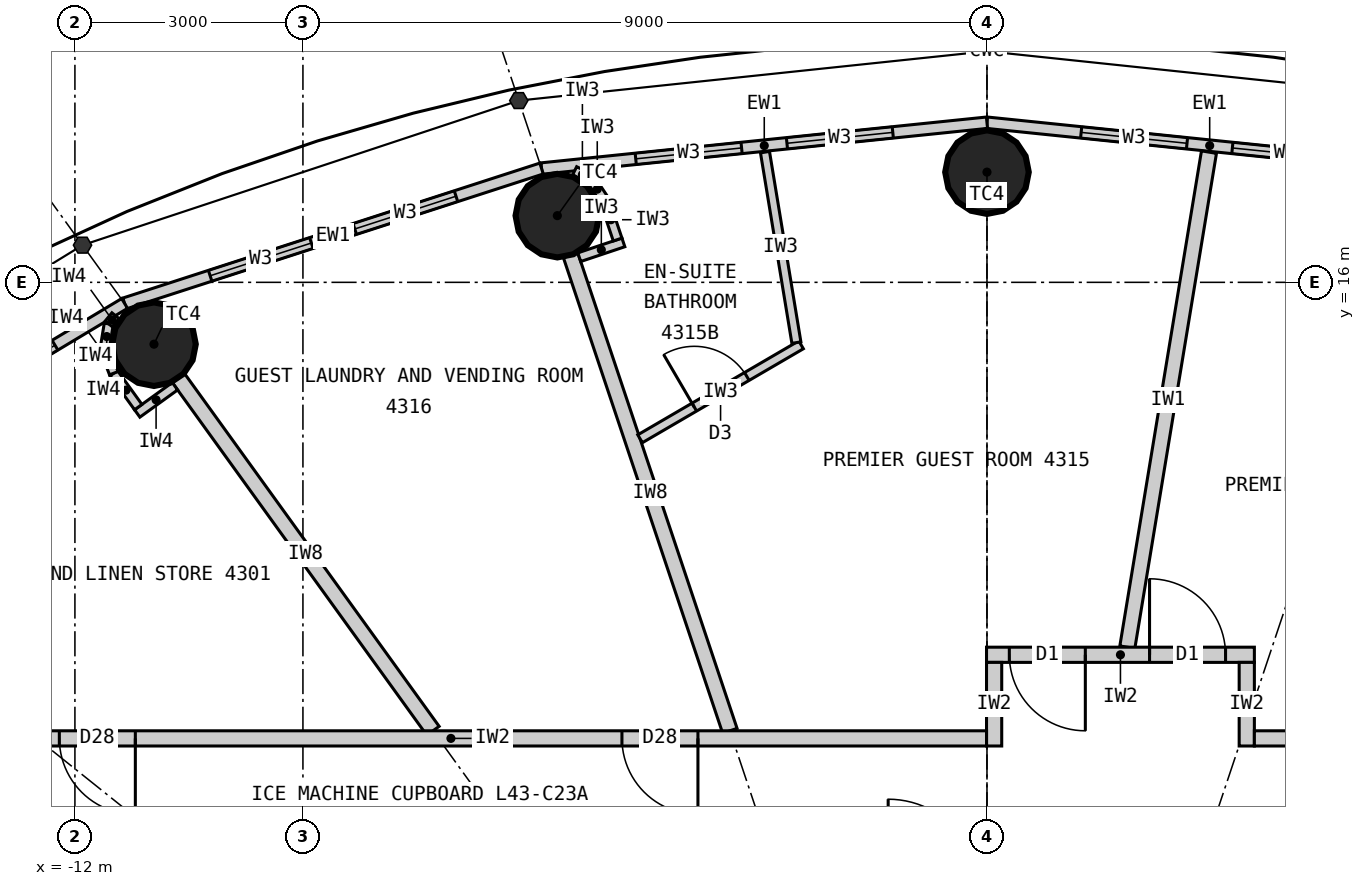
"""IFC4 building model, lengths in metres.
Left out: names, types, materials, properties, quantities, classifications, styles, units other than length and angle.
Written with IfcOpenShell. Run it as: python <this file> out.ifc"""

import sys

from ifc_helpers import new_model, si_unit, direction, frame, frame_2d, origin, origin_2d, place, context, subcontext, project, spatial, rectangle, circle, extrude, element, fill, save


model = new_model("IFC4")
c1 = context("Model", 3, precision=1e-05, world=origin(), true_north=direction((0.0, 1.0)))
c2 = subcontext(c1, "Body", "Model", "MODEL_VIEW")
j1 = project(units=[si_unit("LENGTHUNIT", "METRE"), si_unit("PLANEANGLEUNIT", "RADIAN")], contexts=[c1])
p1 = place(None, origin())
s1 = spatial("IfcSite", under=j1, at=p1, CompositionType="ELEMENT")
p2 = place(p1, origin())
s2 = spatial("IfcBuilding", under=s1, at=p2, CompositionType="ELEMENT")
p3 = place(p2, frame((0.0, 0.0, 163.2)))
s3 = spatial("IfcBuildingStorey", under=s2, at=p3, CompositionType="ELEMENT", Elevation=163.2)
for number, where, z_axis, x_axis in (
    (1, (0.0, 17.45, 0.0), (0.0, 0.0, 1.0), (1.0, 0.0, 0.0)),
    (2, (-5.653, 16.877, 0.0), (0.0, 0.0, 1.0), (1.0, 0.0, 0.0)),
    (3, (-10.96, 15.186, 0.0), (0.0, 0.0, 1.0), (1.0, 0.0, 0.0)),
):
    element("IfcColumn", number, at=place(p3, frame(where, z_axis=z_axis, x_axis=x_axis)), inside=s3, PredefinedType="COLUMN", context=c2, shape_type="SweptSolid", body=[
        extrude(circle(Radius=0.55, at=origin_2d()), origin(), (0.0, 0.0, 1.0), 3.3),
    ])
p4 = place(p3, frame((5.86, 17.497, 0.0), z_axis=(0.0, 0.0, 1.0), x_axis=(-0.994751738032, 0.102318032045, 0.0)))
e4 = element("IfcWall", 4, at=p4, inside=s3, PredefinedType="ELEMENTEDWALL", context=c2, shape_type="SweptSolid", body=[
    extrude(rectangle(XDim=5.891, YDim=0.15, at=frame_2d((2.946, 0.0))), origin(), (0.0, 0.0, 1.0), 3.12),
])
p5 = place(p4, frame((1.246, 0.0, 0.9)))
e5 = element("IfcOpeningElement", 5, at=p5, cuts=e4, PredefinedType="OPENING", context=c2, shape_type="SweptSolid", body=[
    extrude(rectangle(XDim=1.4, YDim=1.9, at=frame_2d((0.7, 0.95))), frame((0.0, 0.085, 0.0), z_axis=(0.0, -1.0, 0.0), x_axis=(1.0, 0.0, 0.0)), (0.0, 0.0, 1.0), 0.17),
])
p6 = place(p4, frame((3.246, 0.0, 0.9)))
e6 = element("IfcOpeningElement", 6, at=p6, cuts=e4, PredefinedType="OPENING", context=c2, shape_type="SweptSolid", body=[
    extrude(rectangle(XDim=1.4, YDim=1.9, at=frame_2d((0.7, 0.95))), frame((0.0, 0.085, 0.0), z_axis=(0.0, -1.0, 0.0), x_axis=(1.0, 0.0, 0.0)), (0.0, 0.0, 1.0), 0.17),
])
p7 = place(p3, frame((0.0, 18.1, 0.0), z_axis=(0.0, 0.0, 1.0), x_axis=(-0.994751738032, -0.102318032045, 0.0)))
e7 = element("IfcWall", 7, at=p7, inside=s3, PredefinedType="ELEMENTEDWALL", context=c2, shape_type="SweptSolid", body=[
    extrude(rectangle(XDim=5.891, YDim=0.15, at=frame_2d((2.946, 0.0))), origin(), (0.0, 0.0, 1.0), 3.12),
])
p8 = place(p7, frame((1.246, 0.0, 0.9)))
e8 = element("IfcOpeningElement", 8, at=p8, cuts=e7, PredefinedType="OPENING", context=c2, shape_type="SweptSolid", body=[
    extrude(rectangle(XDim=1.4, YDim=1.9, at=frame_2d((0.7, 0.95))), frame((0.0, 0.085, 0.0), z_axis=(0.0, -1.0, 0.0), x_axis=(1.0, 0.0, 0.0)), (0.0, 0.0, 1.0), 0.17),
])
p9 = place(p7, frame((3.246, 0.0, 0.9)))
e9 = element("IfcOpeningElement", 9, at=p9, cuts=e7, PredefinedType="OPENING", context=c2, shape_type="SweptSolid", body=[
    extrude(rectangle(XDim=1.4, YDim=1.9, at=frame_2d((0.7, 0.95))), frame((0.0, 0.085, 0.0), z_axis=(0.0, -1.0, 0.0), x_axis=(1.0, 0.0, 0.0)), (0.0, 0.0, 1.0), 0.17),
])
p10 = place(p3, frame((-5.86, 17.497, 0.0), z_axis=(0.0, 0.0, 1.0), x_axis=(-0.951432482129, -0.307857486429, 0.0)))
e10 = element("IfcWall", 10, at=p10, inside=s3, PredefinedType="ELEMENTEDWALL", context=c2, shape_type="SweptSolid", body=[
    extrude(rectangle(XDim=5.766, YDim=0.15, at=frame_2d((2.883, 0.0))), origin(), (0.0, 0.0, 1.0), 3.12),
])
p11 = place(p10, frame((1.183, 0.0, 0.9)))
e11 = element("IfcOpeningElement", 11, at=p11, cuts=e10, PredefinedType="OPENING", context=c2, shape_type="SweptSolid", body=[
    extrude(rectangle(XDim=1.4, YDim=1.9, at=frame_2d((0.7, 0.95))), frame((0.0, 0.085, 0.0), z_axis=(0.0, -1.0, 0.0), x_axis=(1.0, 0.0, 0.0)), (0.0, 0.0, 1.0), 0.17),
])
p12 = place(p10, frame((3.183, 0.0, 0.9)))
e12 = element("IfcOpeningElement", 12, at=p12, cuts=e10, PredefinedType="OPENING", context=c2, shape_type="SweptSolid", body=[
    extrude(rectangle(XDim=1.4, YDim=1.9, at=frame_2d((0.7, 0.95))), frame((0.0, 0.085, 0.0), z_axis=(0.0, -1.0, 0.0), x_axis=(1.0, 0.0, 0.0)), (0.0, 0.0, 1.0), 0.17),
])
p13 = place(p3, frame((-11.346, 15.722, 0.0), z_axis=(0.0, 0.0, 1.0), x_axis=(-0.857695199231, -0.514158482587, 0.0)))
e13 = element("IfcWall", 13, at=p13, inside=s3, PredefinedType="ELEMENTEDWALL", context=c2, shape_type="SweptSolid", body=[
    extrude(rectangle(XDim=5.536, YDim=0.15, at=frame_2d((2.768, 0.0))), origin(), (0.0, 0.0, 1.0), 3.12),
])
p14 = place(p13, frame((1.068, 0.0, 0.9)))
e14 = element("IfcOpeningElement", 14, at=p14, cuts=e13, PredefinedType="OPENING", context=c2, shape_type="SweptSolid", body=[
    extrude(rectangle(XDim=1.4, YDim=1.9, at=frame_2d((0.7, 0.95))), frame((0.0, 0.085, 0.0), z_axis=(0.0, -1.0, 0.0), x_axis=(1.0, 0.0, 0.0)), (0.0, 0.0, 1.0), 0.17),
])
p15 = place(p13, frame((3.068, 0.0, 0.9)))
e15 = element("IfcOpeningElement", 15, at=p15, cuts=e13, PredefinedType="OPENING", context=c2, shape_type="SweptSolid", body=[
    extrude(rectangle(XDim=1.4, YDim=1.9, at=frame_2d((0.7, 0.95))), frame((0.0, 0.085, 0.0), z_axis=(0.0, -1.0, 0.0), x_axis=(1.0, 0.0, 0.0)), (0.0, 0.0, 1.0), 0.17),
])
p16 = place(p3, frame((1.847, 11.2, 0.0), z_axis=(0.0, 0.0, 1.0), x_axis=(0.162695449404, 0.986676335352, 0.0)))
e16 = element("IfcWall", 16, at=p16, inside=s3, PredefinedType="PARTITIONING", context=c2, shape_type="SweptSolid", body=[
    extrude(rectangle(XDim=6.601, YDim=0.2, at=frame_2d((3.301, 0.0))), origin(), (0.0, 0.0, 1.0), 3.12),
])
p17 = place(p3, frame((-3.383, 10.1, 0.0), z_axis=(0.0, 0.0, 1.0), x_axis=(-0.317615120474, 0.948219718866, 0.0)))
e17 = element("IfcWall", 17, at=p17, inside=s3, PredefinedType="PARTITIONING", context=c2, shape_type="SweptSolid", body=[
    extrude(rectangle(XDim=6.597, YDim=0.2, at=frame_2d((3.299, 0.0))), origin(), (0.0, 0.0, 1.0), 2.42),
])
p18 = place(p3, frame((-7.289, 10.1, 0.0), z_axis=(0.0, 0.0, 1.0), x_axis=(-0.585222595178, 0.810872686735, 0.0)))
e18 = element("IfcWall", 18, at=p18, inside=s3, PredefinedType="PARTITIONING", context=c2, shape_type="SweptSolid", body=[
    extrude(rectangle(XDim=5.722, YDim=0.2, at=frame_2d((2.861, 0.0))), origin(), (0.0, 0.0, 1.0), 2.42),
])
p19 = place(p3, frame((-0.006, 11.1, 0.0), z_axis=(0.0, 0.0, 1.0), x_axis=(1.0, 0.0, 0.0)))
e19 = element("IfcWall", 19, at=p19, inside=s3, PredefinedType="PARTITIONING", context=c2, shape_type="SweptSolid", body=[
    extrude(rectangle(XDim=3.524, YDim=0.2, at=frame_2d((1.762, 0.0))), origin(), (0.0, 0.0, 1.0), 3.12),
])
p20 = place(p19, frame((2.145, 0.0, 0.0)))
e20 = element("IfcOpeningElement", 20, at=p20, cuts=e19, PredefinedType="OPENING", context=c2, shape_type="SweptSolid", body=[
    extrude(rectangle(XDim=1.0, YDim=2.2, at=frame_2d((0.5, 1.1))), frame((0.0, 0.11, 0.0), z_axis=(0.0, -1.0, 0.0), x_axis=(1.0, 0.0, 0.0)), (0.0, 0.0, 1.0), 0.22),
])
p21 = place(p19, frame((0.3, 0.0, 0.0)))
e21 = element("IfcOpeningElement", 21, at=p21, cuts=e19, PredefinedType="OPENING", context=c2, shape_type="SweptSolid", body=[
    extrude(rectangle(XDim=1.0, YDim=2.2, at=frame_2d((0.5, 1.1))), frame((0.0, 0.11, 0.0), z_axis=(0.0, -1.0, 0.0), x_axis=(1.0, 0.0, 0.0)), (0.0, 0.0, 1.0), 0.22),
])
p22 = place(p3, frame((0.094, 9.9, 0.0), z_axis=(0.0, 0.0, 1.0), x_axis=(0.0, 1.0, 0.0)))
e22 = element("IfcWall", 22, at=p22, inside=s3, PredefinedType="PARTITIONING", context=c2, shape_type="SweptSolid", body=[
    extrude(rectangle(XDim=1.1, YDim=0.2, at=frame_2d((0.55, 0.0))), origin(), (0.0, 0.0, 1.0), 2.42),
])
p23 = place(p3, frame((3.418, 9.9, 0.0), z_axis=(0.0, 0.0, 1.0), x_axis=(0.0, 1.0, 0.0)))
e23 = element("IfcWall", 23, at=p23, inside=s3, PredefinedType="PARTITIONING", context=c2, shape_type="SweptSolid", body=[
    extrude(rectangle(XDim=1.1, YDim=0.2, at=frame_2d((0.55, 0.0))), origin(), (0.0, 0.0, 1.0), 3.12),
])
p24 = place(p3, frame((-4.564, 13.942, 0.0), z_axis=(0.0, 0.0, 1.0), x_axis=(0.863717519451, 0.503976236139, 0.0)))
e24 = element("IfcWall", 24, at=p24, inside=s3, PredefinedType="PARTITIONING", context=c2, shape_type="SweptSolid", body=[
    extrude(rectangle(XDim=2.453, YDim=0.12, at=frame_2d((1.226, 0.0))), origin(), (0.0, 0.0, 1.0), 3.12),
])
p25 = place(p24, frame((0.826, 0.0, 0.0)))
e25 = element("IfcOpeningElement", 25, at=p25, cuts=e24, PredefinedType="OPENING", context=c2, shape_type="SweptSolid", body=[
    extrude(rectangle(XDim=0.8, YDim=2.1, at=frame_2d((0.4, 1.05))), frame((0.0, 0.07, 0.0), z_axis=(0.0, -1.0, 0.0), x_axis=(1.0, 0.0, 0.0)), (0.0, 0.0, 1.0), 0.14),
])
p26 = place(p3, frame((-2.508, 15.207, 0.0), z_axis=(0.0, 0.0, 1.0), x_axis=(-0.162637365963, 0.986685911115, 0.0)))
e26 = element("IfcWall", 26, at=p26, inside=s3, PredefinedType="PARTITIONING", context=c2, shape_type="SweptSolid", body=[
    extrude(rectangle(XDim=2.54, YDim=0.12, at=frame_2d((1.27, 0.0))), origin(), (0.0, 0.0, 1.0), 3.12),
])
p27 = place(p3, frame((-5.364, 16.331, 0.0), z_axis=(0.0, 0.0, 1.0), x_axis=(0.948283770087, 0.317423835572, 0.0)))
e27 = element("IfcWall", 27, at=p27, inside=s3, PredefinedType="PARTITIONING", context=c2, shape_type="SweptSolid", body=[
    extrude(rectangle(XDim=0.612, YDim=0.12, at=frame_2d((0.306, 0.0))), origin(), (0.0, 0.0, 1.0), 3.12),
])
p28 = place(p3, frame((-4.86, 16.563, 0.0), z_axis=(0.0, 0.0, 1.0), x_axis=(-0.317825321803, 0.948149284038, 0.0)))
e28 = element("IfcWall", 28, at=p28, inside=s3, PredefinedType="PARTITIONING", context=c2, shape_type="SweptSolid", body=[
    extrude(rectangle(XDim=0.55, YDim=0.12, at=frame_2d((0.275, 0.0))), origin(), (0.0, 0.0, 1.0), 3.12),
])
p29 = place(p3, frame((-5.034, 17.084, 0.0), z_axis=(0.0, 0.0, 1.0), x_axis=(-0.552362205726, 0.833604218851, 0.0)))
e29 = element("IfcWall", 29, at=p29, inside=s3, PredefinedType="PARTITIONING", context=c2, shape_type="SweptSolid", body=[
    extrude(rectangle(XDim=0.338, YDim=0.12, at=frame_2d((0.169, 0.0))), origin(), (0.0, 0.0, 1.0), 3.12),
])
p30 = place(p3, frame((-5.221, 17.366, 0.0), z_axis=(0.0, 0.0, 1.0), x_axis=(-0.895067896179, 0.445929883759, 0.0)))
e30 = element("IfcWall", 30, at=p30, inside=s3, PredefinedType="PARTITIONING", context=c2, shape_type="SweptSolid", body=[
    extrude(rectangle(XDim=0.228, YDim=0.12, at=frame_2d((0.114, 0.0))), origin(), (0.0, 0.0, 1.0), 3.12),
])
p31 = place(p3, frame((-14.1, 10.0, 0.0), z_axis=(0.0, 0.0, 1.0), x_axis=(1.0, 0.0, 0.0)))
e31 = element("IfcWall", 31, at=p31, inside=s3, PredefinedType="PARTITIONING", context=c2, shape_type="SweptSolid", body=[
    extrude(rectangle(XDim=14.094, YDim=0.2, at=frame_2d((7.047, 0.0))), origin(), (0.0, 0.0, 1.0), 3.12),
])
p32 = place(p31, frame((1.895, 0.0, 0.0)))
e32 = element("IfcOpeningElement", 32, at=p32, cuts=e31, PredefinedType="OPENING", context=c2, shape_type="SweptSolid", body=[
    extrude(rectangle(XDim=1.0, YDim=2.2, at=frame_2d((0.5, 1.1))), frame((0.0, 0.11, 0.0), z_axis=(0.0, -1.0, 0.0), x_axis=(1.0, 0.0, 0.0)), (0.0, 0.0, 1.0), 0.22),
])
p33 = place(p31, frame((9.297, 0.0, 0.0)))
e33 = element("IfcOpeningElement", 33, at=p33, cuts=e31, PredefinedType="OPENING", context=c2, shape_type="SweptSolid", body=[
    extrude(rectangle(XDim=1.0, YDim=2.2, at=frame_2d((0.5, 1.1))), frame((0.0, 0.11, 0.0), z_axis=(0.0, -1.0, 0.0), x_axis=(1.0, 0.0, 0.0)), (0.0, 0.0, 1.0), 0.22),
])
p34 = place(p3, frame((3.518, 10.0, 0.0), z_axis=(0.0, 0.0, 1.0), x_axis=(1.0, 0.0, 0.0)))
e34 = element("IfcWall", 34, at=p34, inside=s3, PredefinedType="PARTITIONING", context=c2, shape_type="SweptSolid", body=[
    extrude(rectangle(XDim=10.582, YDim=0.2, at=frame_2d((5.291, 0.0))), origin(), (0.0, 0.0, 1.0), 3.12),
])
p35 = place(p34, frame((4.621, 0.0, 0.0)))
e35 = element("IfcOpeningElement", 35, at=p35, cuts=e34, PredefinedType="OPENING", context=c2, shape_type="SweptSolid", body=[
    extrude(rectangle(XDim=1.0, YDim=2.2, at=frame_2d((0.5, 1.1))), frame((0.0, 0.11, 0.0), z_axis=(0.0, -1.0, 0.0), x_axis=(1.0, 0.0, 0.0)), (0.0, 0.0, 1.0), 0.22),
])
p36 = place(p3, frame((-10.684, 14.633, 0.0), z_axis=(0.0, 0.0, 1.0), x_axis=(-0.810921075692, -0.585155542568, 0.0)))
e36 = element("IfcWall", 36, at=p36, inside=s3, PredefinedType="PARTITIONING", context=c2, shape_type="SweptSolid", body=[
    extrude(rectangle(XDim=0.612, YDim=0.12, at=frame_2d((0.306, 0.0))), origin(), (0.0, 0.0, 1.0), 3.12),
])
p37 = place(p3, frame((-11.167, 14.359, 0.0), z_axis=(0.0, 0.0, 1.0), x_axis=(-0.585263549799, 0.810843127415, 0.0)))
e37 = element("IfcWall", 37, at=p37, inside=s3, PredefinedType="PARTITIONING", context=c2, shape_type="SweptSolid", body=[
    extrude(rectangle(XDim=0.55, YDim=0.12, at=frame_2d((0.275, 0.0))), origin(), (0.0, 0.0, 1.0), 3.12),
])
for number, where, z_axis, x_axis in (
    (38, (-11.489, 14.804, 0.0), (0.0, 0.0, 1.0), (-0.356, 0.935, 0.0)),
    (39, (-11.609, 15.12, 0.0), (0.0, 0.0, 1.0), (0.16, 0.987, 0.0)),
):
    element("IfcWall", number, at=place(p3, frame(where, z_axis=z_axis, x_axis=x_axis)), inside=s3, PredefinedType="PARTITIONING", context=c2, shape_type="SweptSolid", body=[
        extrude(rectangle(XDim=0.338, YDim=0.12, at=frame_2d((0.169, 0.0))), origin(), (0.0, 0.0, 1.0), 3.12),
    ])
p38 = place(p3, frame((-11.555, 15.453, 0.0), z_axis=(0.0, 0.0, 1.0), x_axis=(0.631711901025, 0.775203246964, 0.0)))
e40 = element("IfcWall", 40, at=p38, inside=s3, PredefinedType="PARTITIONING", context=c2, shape_type="SweptSolid", body=[
    extrude(rectangle(XDim=0.139, YDim=0.12, at=frame_2d((0.07, 0.0))), origin(), (0.0, 0.0, 1.0), 3.12),
])
p39 = place(p5, origin())
e41 = element("IfcWindow", 41, at=p39, inside=s3, PartitioningType="SINGLE_PANEL", PredefinedType="WINDOW", context=c2, shape_type="SweptSolid", body=[
    extrude(rectangle(XDim=1.4, YDim=1.9, at=frame_2d((0.7, 0.95))), frame((0.0, 0.03, 0.0), z_axis=(0.0, -1.0, 0.0), x_axis=(1.0, 0.0, 0.0)), (0.0, 0.0, 1.0), 0.06),
])
fill(e5, e41)
p40 = place(p6, origin())
e42 = element("IfcWindow", 42, at=p40, inside=s3, PartitioningType="SINGLE_PANEL", PredefinedType="WINDOW", context=c2, shape_type="SweptSolid", body=[
    extrude(rectangle(XDim=1.4, YDim=1.9, at=frame_2d((0.7, 0.95))), frame((0.0, 0.03, 0.0), z_axis=(0.0, -1.0, 0.0), x_axis=(1.0, 0.0, 0.0)), (0.0, 0.0, 1.0), 0.06),
])
fill(e6, e42)
p41 = place(p8, origin())
e43 = element("IfcWindow", 43, at=p41, inside=s3, PartitioningType="SINGLE_PANEL", PredefinedType="WINDOW", context=c2, shape_type="SweptSolid", body=[
    extrude(rectangle(XDim=1.4, YDim=1.9, at=frame_2d((0.7, 0.95))), frame((0.0, 0.03, 0.0), z_axis=(0.0, -1.0, 0.0), x_axis=(1.0, 0.0, 0.0)), (0.0, 0.0, 1.0), 0.06),
])
fill(e8, e43)
p42 = place(p9, origin())
e44 = element("IfcWindow", 44, at=p42, inside=s3, PartitioningType="SINGLE_PANEL", PredefinedType="WINDOW", context=c2, shape_type="SweptSolid", body=[
    extrude(rectangle(XDim=1.4, YDim=1.9, at=frame_2d((0.7, 0.95))), frame((0.0, 0.03, 0.0), z_axis=(0.0, -1.0, 0.0), x_axis=(1.0, 0.0, 0.0)), (0.0, 0.0, 1.0), 0.06),
])
fill(e9, e44)
p43 = place(p11, origin())
e45 = element("IfcWindow", 45, at=p43, inside=s3, PartitioningType="SINGLE_PANEL", PredefinedType="WINDOW", context=c2, shape_type="SweptSolid", body=[
    extrude(rectangle(XDim=1.4, YDim=1.9, at=frame_2d((0.7, 0.95))), frame((0.0, 0.03, 0.0), z_axis=(0.0, -1.0, 0.0), x_axis=(1.0, 0.0, 0.0)), (0.0, 0.0, 1.0), 0.06),
])
fill(e11, e45)
p44 = place(p12, origin())
e46 = element("IfcWindow", 46, at=p44, inside=s3, PartitioningType="SINGLE_PANEL", PredefinedType="WINDOW", context=c2, shape_type="SweptSolid", body=[
    extrude(rectangle(XDim=1.4, YDim=1.9, at=frame_2d((0.7, 0.95))), frame((0.0, 0.03, 0.0), z_axis=(0.0, -1.0, 0.0), x_axis=(1.0, 0.0, 0.0)), (0.0, 0.0, 1.0), 0.06),
])
fill(e12, e46)
p45 = place(p14, origin())
e47 = element("IfcWindow", 47, at=p45, inside=s3, PartitioningType="SINGLE_PANEL", PredefinedType="WINDOW", context=c2, shape_type="SweptSolid", body=[
    extrude(rectangle(XDim=1.4, YDim=1.9, at=frame_2d((0.7, 0.95))), frame((0.0, 0.03, 0.0), z_axis=(0.0, -1.0, 0.0), x_axis=(1.0, 0.0, 0.0)), (0.0, 0.0, 1.0), 0.06),
])
fill(e14, e47)
p46 = place(p32, origin())
e48 = element("IfcDoor", 48, at=p46, inside=s3, OperationType="SINGLE_SWING_RIGHT", PredefinedType="DOOR", context=c2, shape_type="SweptSolid", body=[
    extrude(rectangle(XDim=1.0, YDim=2.2, at=frame_2d((0.5, 1.1))), frame((0.0, 0.025, 0.0), z_axis=(0.0, -1.0, 0.0), x_axis=(1.0, 0.0, 0.0)), (0.0, 0.0, 1.0), 0.05),
])
fill(e32, e48)
p47 = place(p20, origin())
e49 = element("IfcDoor", 49, at=p47, inside=s3, OperationType="SINGLE_SWING_LEFT", PredefinedType="DOOR", context=c2, shape_type="SweptSolid", body=[
    extrude(rectangle(XDim=1.0, YDim=2.2, at=frame_2d((0.5, 1.1))), frame((0.0, 0.025, 0.0), z_axis=(0.0, -1.0, 0.0), x_axis=(1.0, 0.0, 0.0)), (0.0, 0.0, 1.0), 0.05),
])
fill(e20, e49)
p48 = place(p25, origin())
e50 = element("IfcDoor", 50, at=p48, inside=s3, OperationType="SINGLE_SWING_LEFT", PredefinedType="DOOR", context=c2, shape_type="SweptSolid", body=[
    extrude(rectangle(XDim=0.8, YDim=2.1, at=frame_2d((0.4, 1.05))), frame((0.0, 0.025, 0.0), z_axis=(0.0, -1.0, 0.0), x_axis=(1.0, 0.0, 0.0)), (0.0, 0.0, 1.0), 0.05),
])
fill(e25, e50)
p49 = place(p21, origin())
e51 = element("IfcDoor", 51, at=p49, inside=s3, OperationType="SINGLE_SWING_RIGHT", PredefinedType="DOOR", context=c2, shape_type="SweptSolid", body=[
    extrude(rectangle(XDim=1.0, YDim=2.2, at=frame_2d((0.5, 1.1))), frame((0.0, 0.025, 0.0), z_axis=(0.0, -1.0, 0.0), x_axis=(1.0, 0.0, 0.0)), (0.0, 0.0, 1.0), 0.05),
])
fill(e21, e51)
p50 = place(p33, origin())
e52 = element("IfcDoor", 52, at=p50, inside=s3, OperationType="SINGLE_SWING_RIGHT", PredefinedType="DOOR", context=c2, shape_type="SweptSolid", body=[
    extrude(rectangle(XDim=1.0, YDim=2.2, at=frame_2d((0.5, 1.1))), frame((0.0, 0.025, 0.0), z_axis=(0.0, -1.0, 0.0), x_axis=(1.0, 0.0, 0.0)), (0.0, 0.0, 1.0), 0.05),
])
fill(e33, e52)
save(model, sys.argv[1])
